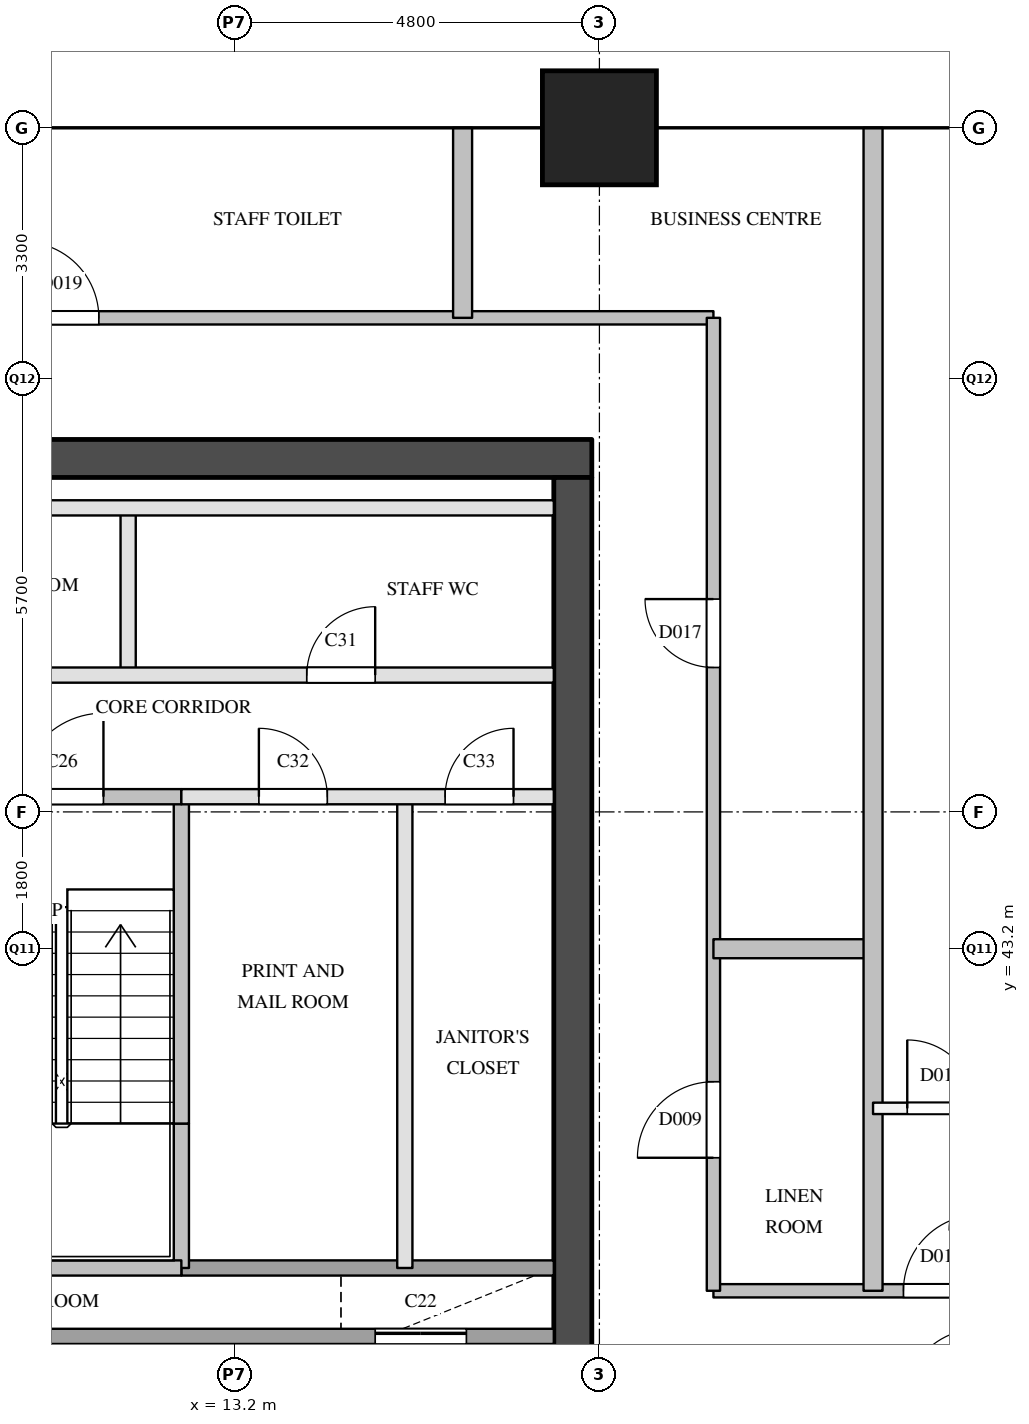
"""IFC4 building model, lengths in metres.
Left out: names, types, materials, properties, quantities, classifications, styles, units other than length and angle.
Written with IfcOpenShell. Run it as: python <this file> out.ifc"""

import sys

from ifc_helpers import new_model, si_unit, direction, frame, frame_2d, origin, origin_2d, place, context, subcontext, project, spatial, rectangle, extrude, element, fill, save


model = new_model("IFC4")
c1 = context("Model", 3, precision=1e-05, world=origin(), true_north=direction((0.0, 1.0)))
c2 = subcontext(c1, "Body", "Model", "MODEL_VIEW")
j1 = project(units=[si_unit("LENGTHUNIT", "METRE"), si_unit("PLANEANGLEUNIT", "RADIAN")], contexts=[c1])
p1 = place(None, origin())
s1 = spatial("IfcSite", under=j1, at=p1, CompositionType="ELEMENT")
p2 = place(p1, origin())
s2 = spatial("IfcBuilding", under=s1, at=p2, CompositionType="ELEMENT")
p3 = place(p2, frame((0.0, 0.0, 162.2)))
s3 = spatial("IfcBuildingStorey", under=s2, at=p3, CompositionType="ELEMENT", Elevation=162.2)
p4 = place(p3, frame((18.0, 54.0, 0.0), z_axis=(0.0, 0.0, 1.0), x_axis=(1.0, 0.0, 0.0)))
e1 = element("IfcColumn", 1, at=p4, inside=s3, PredefinedType="COLUMN", context=c2, shape_type="SweptSolid", body=[
    extrude(rectangle(XDim=1.5, YDim=1.5, at=origin_2d()), origin(), (0.0, 0.0, 1.0), 3.9),
])
p5 = place(p3, frame((5.7, 49.65, 0.0), z_axis=(0.0, 0.0, 1.0), x_axis=(1.0, 0.0, 0.0)))
e2 = element("IfcWall", 2, at=p5, inside=s3, PredefinedType="SHEAR", context=c2, shape_type="SweptSolid", body=[
    extrude(rectangle(XDim=12.2, YDim=0.5, at=frame_2d((6.1, 0.0))), origin(), (0.0, 0.0, 1.0), 3.6),
])
p6 = place(p3, frame((17.65, 29.1, 0.0), z_axis=(0.0, 0.0, 1.0), x_axis=(0.0, 1.0, 0.0)))
e3 = element("IfcWall", 3, at=p6, inside=s3, PredefinedType="SHEAR", context=c2, shape_type="SweptSolid", body=[
    extrude(rectangle(XDim=20.3, YDim=0.5, at=frame_2d((10.15, 0.0))), origin(), (0.0, 0.0, 1.0), 3.6),
])
p7 = place(p6, frame((1.25, 0.0, 0.0)))
e4 = element("IfcOpeningElement", 4, at=p7, cuts=e3, PredefinedType="OPENING", context=c2, shape_type="SweptSolid", body=[
    extrude(rectangle(XDim=0.7, YDim=2.1, at=frame_2d((0.35, 1.05))), frame((0.0, 0.26, 0.0), z_axis=(0.0, -1.0, 0.0), x_axis=(1.0, 0.0, 0.0)), (0.0, 0.0, 1.0), 0.52),
])
p8 = place(p6, frame((7.05, 0.0, 0.0)))
e5 = element("IfcOpeningElement", 5, at=p8, cuts=e3, PredefinedType="OPENING", context=c2, shape_type="SweptSolid", body=[
    extrude(rectangle(XDim=0.7, YDim=2.1, at=frame_2d((0.35, 1.05))), frame((0.0, 0.26, 0.0), z_axis=(0.0, -1.0, 0.0), x_axis=(1.0, 0.0, 0.0)), (0.0, 0.0, 1.0), 0.52),
])
p9 = place(p6, frame((3.6, 0.0, 0.0)))
e6 = element("IfcOpeningElement", 6, at=p9, cuts=e3, PredefinedType="OPENING", context=c2, shape_type="SweptSolid", body=[
    extrude(rectangle(XDim=1.8, YDim=2.1, at=frame_2d((0.9, 1.05))), frame((0.0, 0.26, 0.0), z_axis=(0.0, -1.0, 0.0), x_axis=(1.0, 0.0, 0.0)), (0.0, 0.0, 1.0), 0.52),
])
p10 = place(p3, frame((11.8, 46.8, 0.0), z_axis=(0.0, 0.0, 1.0), x_axis=(0.0, 1.0, 0.0)))
e7 = element("IfcWall", 7, at=p10, inside=s3, PredefinedType="PARTITIONING", context=c2, shape_type="SweptSolid", body=[
    extrude(rectangle(XDim=2.2, YDim=0.2, at=frame_2d((1.1, 0.0))), origin(), (0.0, 0.0, 1.0), 3.6),
])
p11 = place(p3, frame((12.5, 39.0, 0.0), z_axis=(0.0, 0.0, 1.0), x_axis=(0.0, 1.0, 0.0)))
e8 = element("IfcWall", 8, at=p11, inside=s3, PredefinedType="SOLIDWALL", context=c2, shape_type="SweptSolid", body=[
    extrude(rectangle(XDim=1.9, YDim=0.2, at=frame_2d((0.95, 0.0))), origin(), (0.0, 0.0, 1.0), 3.6),
])
p12 = place(p3, frame((12.5, 40.9, 0.0), z_axis=(0.0, 0.0, 1.0), x_axis=(0.0, 1.0, 0.0)))
e9 = element("IfcWall", 9, at=p12, inside=s3, PredefinedType="SOLIDWALL", context=c2, shape_type="SweptSolid", body=[
    extrude(rectangle(XDim=4.3, YDim=0.2, at=frame_2d((2.15, 0.0))), origin(), (0.0, 0.0, 1.0), 3.6),
])
p13 = place(p3, frame((14.6, 34.9, 0.0), z_axis=(0.0, 0.0, 1.0), x_axis=(0.0, 1.0, 0.0)))
e10 = element("IfcWall", 10, at=p13, inside=s3, PredefinedType="SOLIDWALL", context=c2, shape_type="SweptSolid", body=[
    extrude(rectangle(XDim=3.2, YDim=0.2, at=frame_2d((1.6, 0.0))), origin(), (0.0, 0.0, 1.0), 3.6),
])
p14 = place(p3, frame((15.44, 39.0, 0.0), z_axis=(0.0, 0.0, 1.0), x_axis=(0.0, 1.0, 0.0)))
e11 = element("IfcWall", 11, at=p14, inside=s3, PredefinedType="PARTITIONING", context=c2, shape_type="SweptSolid", body=[
    extrude(rectangle(XDim=6.2, YDim=0.2, at=frame_2d((3.1, 0.0))), origin(), (0.0, 0.0, 1.0), 3.6),
])
p15 = place(p3, frame((16.7, 34.9, 0.0), z_axis=(0.0, 0.0, 1.0), x_axis=(0.0, 1.0, 0.0)))
e12 = element("IfcWall", 12, at=p15, inside=s3, PredefinedType="SOLIDWALL", context=c2, shape_type="SweptSolid", body=[
    extrude(rectangle(XDim=3.2, YDim=0.2, at=frame_2d((1.6, 0.0))), origin(), (0.0, 0.0, 1.0), 3.6),
])
p16 = place(p3, frame((6.2, 38.1, 0.0), z_axis=(0.0, 0.0, 1.0), x_axis=(1.0, 0.0, 0.0)))
e13 = element("IfcWall", 13, at=p16, inside=s3, PredefinedType="SOLIDWALL", context=c2, shape_type="SweptSolid", body=[
    extrude(rectangle(XDim=11.2, YDim=0.2, at=frame_2d((5.6, 0.0))), origin(), (0.0, 0.0, 1.0), 3.6),
])
p17 = place(p16, frame((8.85, 0.0, 0.0)))
e14 = element("IfcOpeningElement", 14, at=p17, cuts=e13, PredefinedType="OPENING", context=c2, shape_type="SweptSolid", body=[
    extrude(rectangle(XDim=1.2, YDim=2.1, at=frame_2d((0.6, 1.05))), frame((0.0, 0.11, 0.0), z_axis=(0.0, -1.0, 0.0), x_axis=(1.0, 0.0, 0.0)), (0.0, 0.0, 1.0), 0.22),
])
p18 = place(p3, frame((12.5, 39.0, 0.0), z_axis=(0.0, 0.0, 1.0), x_axis=(1.0, 0.0, 0.0)))
e15 = element("IfcWall", 15, at=p18, inside=s3, PredefinedType="SOLIDWALL", context=c2, shape_type="SweptSolid", body=[
    extrude(rectangle(XDim=4.9, YDim=0.2, at=frame_2d((2.45, 0.0))), origin(), (0.0, 0.0, 1.0), 3.6),
])
p19 = place(p3, frame((9.45, 39.0, 0.0), z_axis=(0.0, 0.0, 1.0), x_axis=(1.0, 0.0, 0.0)))
e16 = element("IfcWall", 16, at=p19, inside=s3, PredefinedType="SOLIDWALL", context=c2, shape_type="SweptSolid", body=[
    extrude(rectangle(XDim=3.05, YDim=0.2, at=frame_2d((1.525, 0.0))), origin(), (0.0, 0.0, 1.0), 3.6),
])
p20 = place(p3, frame((12.5, 45.2, 0.0), z_axis=(0.0, 0.0, 1.0), x_axis=(1.0, 0.0, 0.0)))
e17 = element("IfcWall", 17, at=p20, inside=s3, PredefinedType="PARTITIONING", context=c2, shape_type="SweptSolid", body=[
    extrude(rectangle(XDim=4.9, YDim=0.2, at=frame_2d((2.45, 0.0))), origin(), (0.0, 0.0, 1.0), 3.6),
])
p21 = place(p20, frame((1.02, 0.0, 0.0)))
e18 = element("IfcOpeningElement", 18, at=p21, cuts=e17, PredefinedType="OPENING", context=c2, shape_type="SweptSolid", body=[
    extrude(rectangle(XDim=0.9, YDim=2.1, at=frame_2d((0.45, 1.05))), frame((0.0, 0.11, 0.0), z_axis=(0.0, -1.0, 0.0), x_axis=(1.0, 0.0, 0.0)), (0.0, 0.0, 1.0), 0.22),
])
p22 = place(p20, frame((3.47, 0.0, 0.0)))
e19 = element("IfcOpeningElement", 19, at=p22, cuts=e17, PredefinedType="OPENING", context=c2, shape_type="SweptSolid", body=[
    extrude(rectangle(XDim=0.9, YDim=2.1, at=frame_2d((0.45, 1.05))), frame((0.0, 0.11, 0.0), z_axis=(0.0, -1.0, 0.0), x_axis=(1.0, 0.0, 0.0)), (0.0, 0.0, 1.0), 0.22),
])
p23 = place(p3, frame((6.2, 45.2, 0.0), z_axis=(0.0, 0.0, 1.0), x_axis=(1.0, 0.0, 0.0)))
e20 = element("IfcWall", 20, at=p23, inside=s3, PredefinedType="SOLIDWALL", context=c2, shape_type="SweptSolid", body=[
    extrude(rectangle(XDim=6.3, YDim=0.2, at=frame_2d((3.15, 0.0))), origin(), (0.0, 0.0, 1.0), 3.6),
])
p24 = place(p23, frame((1.025, 0.0, 0.0)))
e21 = element("IfcOpeningElement", 21, at=p24, cuts=e20, PredefinedType="OPENING", context=c2, shape_type="SweptSolid", body=[
    extrude(rectangle(XDim=1.1, YDim=2.1, at=frame_2d((0.55, 1.05))), frame((0.0, 0.11, 0.0), z_axis=(0.0, -1.0, 0.0), x_axis=(1.0, 0.0, 0.0)), (0.0, 0.0, 1.0), 0.22),
])
p25 = place(p23, frame((4.175, 0.0, 0.0)))
e22 = element("IfcOpeningElement", 22, at=p25, cuts=e20, PredefinedType="OPENING", context=c2, shape_type="SweptSolid", body=[
    extrude(rectangle(XDim=1.1, YDim=2.1, at=frame_2d((0.55, 1.05))), frame((0.0, 0.11, 0.0), z_axis=(0.0, -1.0, 0.0), x_axis=(1.0, 0.0, 0.0)), (0.0, 0.0, 1.0), 0.22),
])
p26 = place(p3, frame((6.2, 46.8, 0.0), z_axis=(0.0, 0.0, 1.0), x_axis=(1.0, 0.0, 0.0)))
e23 = element("IfcWall", 23, at=p26, inside=s3, PredefinedType="PARTITIONING", context=c2, shape_type="SweptSolid", body=[
    extrude(rectangle(XDim=11.2, YDim=0.2, at=frame_2d((5.6, 0.0))), origin(), (0.0, 0.0, 1.0), 3.6),
])
p27 = place(p26, frame((2.35, 0.0, 0.0)))
e24 = element("IfcOpeningElement", 24, at=p27, cuts=e23, PredefinedType="OPENING", context=c2, shape_type="SweptSolid", body=[
    extrude(rectangle(XDim=0.9, YDim=2.1, at=frame_2d((0.45, 1.05))), frame((0.0, 0.11, 0.0), z_axis=(0.0, -1.0, 0.0), x_axis=(1.0, 0.0, 0.0)), (0.0, 0.0, 1.0), 0.22),
])
p28 = place(p26, frame((7.95, 0.0, 0.0)))
e25 = element("IfcOpeningElement", 25, at=p28, cuts=e23, PredefinedType="OPENING", context=c2, shape_type="SweptSolid", body=[
    extrude(rectangle(XDim=0.9, YDim=2.1, at=frame_2d((0.45, 1.05))), frame((0.0, 0.11, 0.0), z_axis=(0.0, -1.0, 0.0), x_axis=(1.0, 0.0, 0.0)), (0.0, 0.0, 1.0), 0.22),
])
p29 = place(p3, frame((6.2, 49.0, 0.0), z_axis=(0.0, 0.0, 1.0), x_axis=(1.0, 0.0, 0.0)))
e26 = element("IfcWall", 26, at=p29, inside=s3, PredefinedType="PARTITIONING", context=c2, shape_type="SweptSolid", body=[
    extrude(rectangle(XDim=11.2, YDim=0.2, at=frame_2d((5.6, 0.0))), origin(), (0.0, 0.0, 1.0), 3.6),
])
p30 = place(p3, frame((19.5, 38.7, 0.0), z_axis=(0.0, 0.0, 1.0), x_axis=(1.0, 0.0, 0.0)))
e27 = element("IfcWall", 27, at=p30, inside=s3, PredefinedType="PARTITIONING", context=c2, shape_type="SweptSolid", body=[
    extrude(rectangle(XDim=15.0, YDim=0.175, at=frame_2d((7.5, 0.0))), origin(), (0.0, 0.0, 1.0), 2.6),
])
p31 = place(p30, frame((2.5, 0.0, 0.0)))
e28 = element("IfcOpeningElement", 28, at=p31, cuts=e27, PredefinedType="OPENING", context=c2, shape_type="SweptSolid", body=[
    extrude(rectangle(XDim=1.0, YDim=2.1, at=frame_2d((0.5, 1.05))), frame((0.0, 0.097, 0.0), z_axis=(0.0, -1.0, 0.0), x_axis=(1.0, 0.0, 0.0)), (0.0, 0.0, 1.0), 0.195),
])
p32 = place(p3, frame((4.1, 51.5, 0.0), z_axis=(0.0, 0.0, 1.0), x_axis=(1.0, 0.0, 0.0)))
e29 = element("IfcWall", 29, at=p32, inside=s3, PredefinedType="PARTITIONING", context=c2, shape_type="SweptSolid", body=[
    extrude(rectangle(XDim=15.4, YDim=0.175, at=frame_2d((7.7, 0.0))), origin(), (0.0, 0.0, 1.0), 3.6),
])
p33 = place(p32, frame((6.314, 0.0, 0.0)))
e30 = element("IfcOpeningElement", 30, at=p33, cuts=e29, PredefinedType="OPENING", context=c2, shape_type="SweptSolid", body=[
    extrude(rectangle(XDim=1.0, YDim=2.1, at=frame_2d((0.5, 1.05))), frame((0.0, 0.097, 0.0), z_axis=(0.0, -1.0, 0.0), x_axis=(1.0, 0.0, 0.0)), (0.0, 0.0, 1.0), 0.195),
])
p34 = place(p3, frame((19.5, 38.7, 0.0), z_axis=(0.0, 0.0, 1.0), x_axis=(0.0, 1.0, 0.0)))
e31 = element("IfcWall", 31, at=p34, inside=s3, PredefinedType="PARTITIONING", context=c2, shape_type="SweptSolid", body=[
    extrude(rectangle(XDim=12.8, YDim=0.175, at=frame_2d((6.4, 0.0))), origin(), (0.0, 0.0, 1.0), 3.6),
])
p35 = place(p34, frame((1.75, 0.0, 0.0)))
e32 = element("IfcOpeningElement", 32, at=p35, cuts=e31, PredefinedType="OPENING", context=c2, shape_type="SweptSolid", body=[
    extrude(rectangle(XDim=1.0, YDim=2.1, at=frame_2d((0.5, 1.05))), frame((0.0, 0.097, 0.0), z_axis=(0.0, -1.0, 0.0), x_axis=(1.0, 0.0, 0.0)), (0.0, 0.0, 1.0), 0.195),
])
p36 = place(p34, frame((8.2, 0.0, 0.0)))
e33 = element("IfcOpeningElement", 33, at=p36, cuts=e31, PredefinedType="OPENING", context=c2, shape_type="SweptSolid", body=[
    extrude(rectangle(XDim=0.9, YDim=2.1, at=frame_2d((0.45, 1.05))), frame((0.0, 0.097, 0.0), z_axis=(0.0, -1.0, 0.0), x_axis=(1.0, 0.0, 0.0)), (0.0, 0.0, 1.0), 0.195),
])
p37 = place(p3, frame((21.6, 41.1, 0.0), z_axis=(0.0, 0.0, 1.0), x_axis=(1.0, 0.0, 0.0)))
e34 = element("IfcWall", 34, at=p37, inside=s3, PredefinedType="PARTITIONING", context=c2, shape_type="SweptSolid", body=[
    extrude(rectangle(XDim=1.8, YDim=0.15, at=frame_2d((0.9, 0.0))), origin(), (0.0, 0.0, 1.0), 3.6),
])
p38 = place(p37, frame((0.45, 0.0, 0.0)))
e35 = element("IfcOpeningElement", 35, at=p38, cuts=e34, PredefinedType="OPENING", context=c2, shape_type="SweptSolid", body=[
    extrude(rectangle(XDim=0.9, YDim=2.1, at=frame_2d((0.45, 1.05))), frame((0.0, 0.085, 0.0), z_axis=(0.0, -1.0, 0.0), x_axis=(1.0, 0.0, 0.0)), (0.0, 0.0, 1.0), 0.17),
])
p39 = place(p3, frame((19.5, 43.2, 0.0), z_axis=(0.0, 0.0, 1.0), x_axis=(1.0, 0.0, 0.0)))
e36 = element("IfcWall", 36, at=p39, inside=s3, PredefinedType="PARTITIONING", context=c2, shape_type="SweptSolid", body=[
    extrude(rectangle(XDim=2.1, YDim=0.25, at=frame_2d((1.05, 0.0))), origin(), (0.0, 0.0, 1.0), 3.6),
])
p40 = place(p3, frame((16.2, 51.5, 0.0), z_axis=(0.0, 0.0, 1.0), x_axis=(0.0, 1.0, 0.0)))
e37 = element("IfcWall", 37, at=p40, inside=s3, PredefinedType="PARTITIONING", context=c2, shape_type="SweptSolid", body=[
    extrude(rectangle(XDim=2.5, YDim=0.25, at=frame_2d((1.25, 0.0))), origin(), (0.0, 0.0, 1.0), 2.6),
])
p41 = place(p3, frame((21.6, 38.7, 0.0), z_axis=(0.0, 0.0, 1.0), x_axis=(0.0, 1.0, 0.0)))
e38 = element("IfcWall", 38, at=p41, inside=s3, PredefinedType="PARTITIONING", context=c2, shape_type="SweptSolid", body=[
    extrude(rectangle(XDim=15.3, YDim=0.25, at=frame_2d((7.65, 0.0))), origin(), (0.0, 0.0, 1.0), 2.6),
])
p42 = place(p17, origin())
e39 = element("IfcDoor", 39, at=p42, inside=s3, OperationType="SLIDING_TO_LEFT", PredefinedType="DOOR", context=c2, shape_type="SweptSolid", body=[
    extrude(rectangle(XDim=1.2, YDim=2.1, at=frame_2d((0.6, 1.05))), frame((0.0, 0.025, 0.0), z_axis=(0.0, -1.0, 0.0), x_axis=(1.0, 0.0, 0.0)), (0.0, 0.0, 1.0), 0.05),
])
fill(e14, e39)
p43 = place(p25, origin())
e40 = element("IfcDoor", 40, at=p43, inside=s3, OperationType="SINGLE_SWING_RIGHT", PredefinedType="DOOR", context=c2, shape_type="SweptSolid", body=[
    extrude(rectangle(XDim=1.1, YDim=2.1, at=frame_2d((0.55, 1.05))), frame((0.0, 0.025, 0.0), z_axis=(0.0, -1.0, 0.0), x_axis=(1.0, 0.0, 0.0)), (0.0, 0.0, 1.0), 0.05),
])
fill(e22, e40)
p44 = place(p28, origin())
e41 = element("IfcDoor", 41, at=p44, inside=s3, OperationType="SINGLE_SWING_RIGHT", PredefinedType="DOOR", context=c2, shape_type="SweptSolid", body=[
    extrude(rectangle(XDim=0.9, YDim=2.1, at=frame_2d((0.45, 1.05))), frame((0.0, 0.025, 0.0), z_axis=(0.0, -1.0, 0.0), x_axis=(1.0, 0.0, 0.0)), (0.0, 0.0, 1.0), 0.05),
])
fill(e25, e41)
p45 = place(p21, origin())
e42 = element("IfcDoor", 42, at=p45, inside=s3, OperationType="SINGLE_SWING_LEFT", PredefinedType="DOOR", context=c2, shape_type="SweptSolid", body=[
    extrude(rectangle(XDim=0.9, YDim=2.1, at=frame_2d((0.45, 1.05))), frame((0.0, 0.025, 0.0), z_axis=(0.0, -1.0, 0.0), x_axis=(1.0, 0.0, 0.0)), (0.0, 0.0, 1.0), 0.05),
])
fill(e18, e42)
p46 = place(p22, origin())
e43 = element("IfcDoor", 43, at=p46, inside=s3, OperationType="SINGLE_SWING_RIGHT", PredefinedType="DOOR", context=c2, shape_type="SweptSolid", body=[
    extrude(rectangle(XDim=0.9, YDim=2.1, at=frame_2d((0.45, 1.05))), frame((0.0, 0.025, 0.0), z_axis=(0.0, -1.0, 0.0), x_axis=(1.0, 0.0, 0.0)), (0.0, 0.0, 1.0), 0.05),
])
fill(e19, e43)
p47 = place(p35, origin())
e44 = element("IfcDoor", 44, at=p47, inside=s3, OperationType="SINGLE_SWING_LEFT", PredefinedType="DOOR", context=c2, shape_type="SweptSolid", body=[
    extrude(rectangle(XDim=1.0, YDim=2.1, at=frame_2d((0.5, 1.05))), frame((0.0, 0.025, 0.0), z_axis=(0.0, -1.0, 0.0), x_axis=(1.0, 0.0, 0.0)), (0.0, 0.0, 1.0), 0.05),
])
fill(e32, e44)
p48 = place(p31, origin())
e45 = element("IfcDoor", 45, at=p48, inside=s3, OperationType="SINGLE_SWING_RIGHT", PredefinedType="DOOR", context=c2, shape_type="SweptSolid", body=[
    extrude(rectangle(XDim=1.0, YDim=2.1, at=frame_2d((0.5, 1.05))), frame((0.0, 0.025, 0.0), z_axis=(0.0, -1.0, 0.0), x_axis=(1.0, 0.0, 0.0)), (0.0, 0.0, 1.0), 0.05),
])
fill(e28, e45)
p49 = place(p38, origin())
e46 = element("IfcDoor", 46, at=p49, inside=s3, OperationType="SINGLE_SWING_LEFT", PredefinedType="DOOR", context=c2, shape_type="SweptSolid", body=[
    extrude(rectangle(XDim=0.9, YDim=2.1, at=frame_2d((0.45, 1.05))), frame((0.0, 0.025, 0.0), z_axis=(0.0, -1.0, 0.0), x_axis=(1.0, 0.0, 0.0)), (0.0, 0.0, 1.0), 0.05),
])
fill(e35, e46)
p50 = place(p36, origin())
e47 = element("IfcDoor", 47, at=p50, inside=s3, OperationType="SINGLE_SWING_RIGHT", PredefinedType="DOOR", context=c2, shape_type="SweptSolid", body=[
    extrude(rectangle(XDim=0.9, YDim=2.1, at=frame_2d((0.45, 1.05))), frame((0.0, 0.025, 0.0), z_axis=(0.0, -1.0, 0.0), x_axis=(1.0, 0.0, 0.0)), (0.0, 0.0, 1.0), 0.05),
])
fill(e33, e47)
p51 = place(p33, origin())
e48 = element("IfcDoor", 48, at=p51, inside=s3, OperationType="SINGLE_SWING_LEFT", PredefinedType="DOOR", context=c2, shape_type="SweptSolid", body=[
    extrude(rectangle(XDim=1.0, YDim=2.1, at=frame_2d((0.5, 1.05))), frame((0.0, 0.025, 0.0), z_axis=(0.0, -1.0, 0.0), x_axis=(1.0, 0.0, 0.0)), (0.0, 0.0, 1.0), 0.05),
])
fill(e30, e48)
save(model, sys.argv[1])
